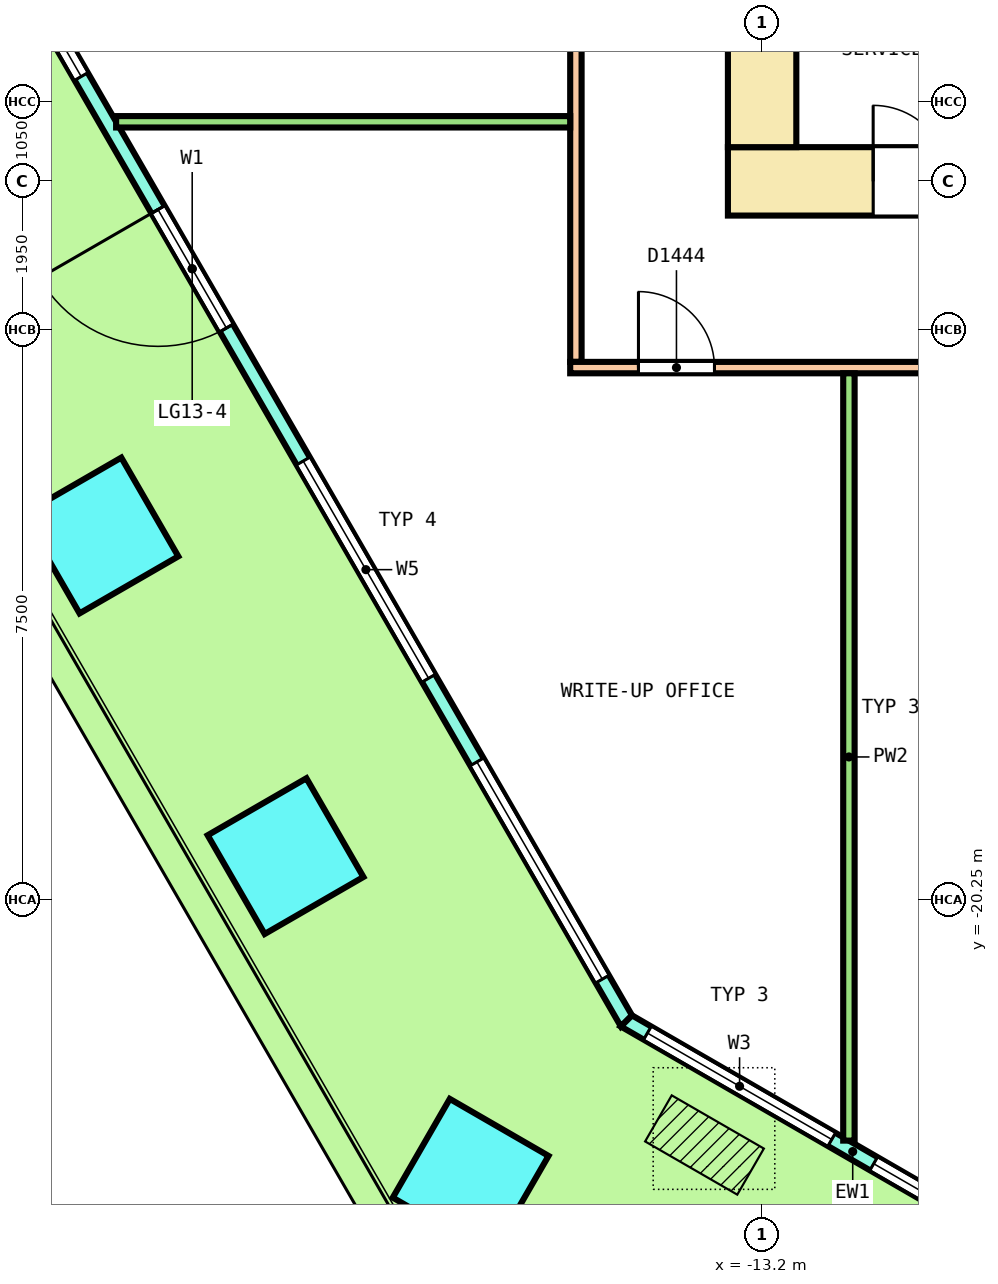
"""IFC4 building model, lengths in metres.
Left out: names, types, materials, properties, quantities, classifications, styles, units other than length and angle.
Written with IfcOpenShell. Run it as: python <this file> out.ifc"""

import sys

from ifc_helpers import new_model, si_unit, direction, frame, frame_2d, origin, origin_2d, place, context, subcontext, project, spatial, polyline, rectangle, outline, extrude, element, fill, save


model = new_model("IFC4")
c1 = context("Model", 3, precision=1e-05, world=origin(), true_north=direction((0.0, 1.0)))
c2 = subcontext(c1, "Body", "Model", "MODEL_VIEW")
j1 = project(units=[si_unit("LENGTHUNIT", "METRE"), si_unit("PLANEANGLEUNIT", "RADIAN")], contexts=[c1])
p1 = place(None, origin())
s1 = spatial("IfcSite", under=j1, at=p1, CompositionType="ELEMENT")
p2 = place(p1, origin())
s2 = spatial("IfcBuilding", under=s1, at=p2, CompositionType="ELEMENT")
p3 = place(p2, frame((0.0, 0.0, 58.6)))
s3 = spatial("IfcBuildingStorey", under=s2, at=p3, CompositionType="ELEMENT", Elevation=58.6)
for number, where, z_axis, x_axis in (
    (1, (-21.905, -15.459, 0.0), (0.0, 0.0, 1.0), (0.5, -0.866, 0.0)),
    (2, (-19.47, -19.677, 0.0), (0.0, 0.0, 1.0), (0.5, -0.866, 0.0)),
    (3, (-17.035, -23.895, 0.0), (0.0, 0.0, 1.0), (0.866, -0.5, 0.0)),
):
    element("IfcColumn", number, at=place(p3, frame(where, z_axis=z_axis, x_axis=x_axis)), inside=s3, PredefinedType="COLUMN", context=c2, shape_type="SweptSolid", body=[
        extrude(rectangle(XDim=1.5, YDim=1.5, at=origin_2d()), origin(), (0.0, 0.0, 1.0), 4.05),
    ])
p4 = place(p3, frame((-26.411, -2.055, 0.0), z_axis=(0.0, 0.0, 1.0), x_axis=(0.50000204422, -0.86602422355, 0.0)))
e4 = element("IfcWall", 4, at=p4, inside=s3, PredefinedType="SOLIDWALL", context=c2, shape_type="SweptSolid", body=[
    extrude(outline(polyline([(-0.027, -0.1), (1.014, -0.1), (2.055, -0.1), (3.097, -0.1), (4.138, -0.1), (5.179, -0.1), (6.22, -0.1), (7.261, -0.1), (8.303, -0.1), (9.344, -0.1), (10.385, -0.1), (11.426, -0.1), (12.468, -0.1), (13.509, -0.1), (14.55, -0.1), (15.591, -0.1), (16.632, -0.1), (17.673, -0.1), (18.715, -0.1), (19.756, -0.1), (20.797, -0.1), (21.838, -0.1), (22.879, -0.1), (22.826, 0.1), (21.789, 0.1), (20.753, 0.1), (19.717, 0.1), (18.68, 0.1), (17.644, 0.1), (16.608, 0.1), (15.572, 0.1), (14.535, 0.1), (13.499, 0.1), (12.463, 0.1), (11.426, 0.1), (10.39, 0.1), (9.354, 0.1), (8.317, 0.1), (7.281, 0.1), (6.245, 0.1), (5.208, 0.1), (4.172, 0.1), (3.136, 0.1), (2.099, 0.1), (1.063, 0.1), (0.027, 0.1), (-0.027, -0.1)])), origin(), (0.0, 0.0, 1.0), 4.1),
])
p5 = place(p4, frame((0.635, 0.0, 0.1)))
e5 = element("IfcOpeningElement", 5, at=p5, cuts=e4, PredefinedType="OPENING", context=c2, shape_type="SweptSolid", body=[
    extrude(rectangle(XDim=3.3, YDim=2.9, at=frame_2d((1.65, 1.45))), frame((0.0, 0.11, 0.0), z_axis=(0.0, -1.0, 0.0), x_axis=(1.0, 0.0, 0.0)), (0.0, 0.0, 1.0), 0.22),
])
p6 = place(p4, frame((5.206, 0.0, 0.1)))
e6 = element("IfcOpeningElement", 6, at=p6, cuts=e4, PredefinedType="OPENING", context=c2, shape_type="SweptSolid", body=[
    extrude(rectangle(XDim=3.3, YDim=2.9, at=frame_2d((1.65, 1.45))), frame((0.0, 0.11, 0.0), z_axis=(0.0, -1.0, 0.0), x_axis=(1.0, 0.0, 0.0)), (0.0, 0.0, 1.0), 0.22),
])
p7 = place(p4, frame((10.526, 0.0, 0.0)))
e7 = element("IfcOpeningElement", 7, at=p7, cuts=e4, PredefinedType="OPENING", context=c2, shape_type="SweptSolid", body=[
    extrude(rectangle(XDim=1.8, YDim=2.4, at=frame_2d((0.9, 1.2))), frame((0.0, 0.11, 0.0), z_axis=(0.0, -1.0, 0.0), x_axis=(1.0, 0.0, 0.0)), (0.0, 0.0, 1.0), 0.22),
])
p8 = place(p4, frame((10.526, 0.0, 2.55)))
e8 = element("IfcOpeningElement", 8, at=p8, cuts=e4, PredefinedType="OPENING", context=c2, shape_type="SweptSolid", body=[
    extrude(rectangle(XDim=1.8, YDim=0.45, at=frame_2d((0.9, 0.225))), frame((0.0, 0.11, 0.0), z_axis=(0.0, -1.0, 0.0), x_axis=(1.0, 0.0, 0.0)), (0.0, 0.0, 1.0), 0.22),
])
p9 = place(p4, frame((14.347, 0.0, 0.1)))
e9 = element("IfcOpeningElement", 9, at=p9, cuts=e4, PredefinedType="OPENING", context=c2, shape_type="SweptSolid", body=[
    extrude(rectangle(XDim=3.3, YDim=2.9, at=frame_2d((1.65, 1.45))), frame((0.0, 0.11, 0.0), z_axis=(0.0, -1.0, 0.0), x_axis=(1.0, 0.0, 0.0)), (0.0, 0.0, 1.0), 0.22),
])
p10 = place(p4, frame((18.917, 0.0, 0.1)))
e10 = element("IfcOpeningElement", 10, at=p10, cuts=e4, PredefinedType="OPENING", context=c2, shape_type="SweptSolid", body=[
    extrude(rectangle(XDim=3.3, YDim=2.9, at=frame_2d((1.65, 1.45))), frame((0.0, 0.11, 0.0), z_axis=(0.0, -1.0, 0.0), x_axis=(1.0, 0.0, 0.0)), (0.0, 0.0, 1.0), 0.22),
])
p11 = place(p3, frame((-14.985, -21.845, 0.0), z_axis=(0.0, 0.0, 1.0), x_axis=(0.866029458321, -0.49999297727, 0.0)))
e11 = element("IfcWall", 11, at=p11, inside=s3, PredefinedType="SOLIDWALL", context=c2, shape_type="SweptSolid", body=[
    extrude(outline(polyline([(-0.027, -0.1), (1.128, -0.1), (2.282, -0.1), (3.437, -0.1), (4.592, -0.1), (5.747, -0.1), (6.901, -0.1), (6.848, 0.1), (5.711, 0.1), (4.574, 0.1), (3.437, 0.1), (2.301, 0.1), (1.164, 0.1), (0.027, 0.1), (-0.027, -0.1)])), origin(), (0.0, 0.0, 1.0), 4.1),
])
p12 = place(p11, frame((0.319, 0.0, 0.1)))
e12 = element("IfcOpeningElement", 12, at=p12, cuts=e11, PredefinedType="OPENING", context=c2, shape_type="SweptSolid", body=[
    extrude(rectangle(XDim=2.8, YDim=2.9, at=frame_2d((1.4, 1.45))), frame((0.0, 0.11, 0.0), z_axis=(0.0, -1.0, 0.0), x_axis=(1.0, 0.0, 0.0)), (0.0, 0.0, 1.0), 0.22),
])
p13 = place(p11, frame((3.756, 0.0, 0.1)))
e13 = element("IfcOpeningElement", 13, at=p13, cuts=e11, PredefinedType="OPENING", context=c2, shape_type="SweptSolid", body=[
    extrude(rectangle(XDim=2.8, YDim=2.9, at=frame_2d((1.4, 1.45))), frame((0.0, 0.11, 0.0), z_axis=(0.0, -1.0, 0.0), x_axis=(1.0, 0.0, 0.0)), (0.0, 0.0, 1.0), 0.22),
])
p14 = place(p3, frame((-13.65, -10.8, 0.0), z_axis=(0.0, 0.0, 1.0), x_axis=(1.0, 0.0, 0.0)))
e14 = element("IfcWall", 14, at=p14, inside=s3, PredefinedType="SHEAR", context=c2, shape_type="SweptSolid", body=[
    extrude(rectangle(XDim=27.3, YDim=0.9, at=frame_2d((13.65, 0.0))), origin(), (0.0, 0.0, 1.0), 4.1),
])
p15 = place(p14, frame((1.911, 0.0, 0.0)))
e15 = element("IfcOpeningElement", 15, at=p15, cuts=e14, PredefinedType="OPENING", context=c2, shape_type="SweptSolid", body=[
    extrude(rectangle(XDim=1.0, YDim=2.1, at=frame_2d((0.5, 1.05))), frame((0.0, 0.46, 0.0), z_axis=(0.0, -1.0, 0.0), x_axis=(1.0, 0.0, 0.0)), (0.0, 0.0, 1.0), 0.92),
])
p16 = place(p14, frame((5.027, 0.0, 0.0)))
e16 = element("IfcOpeningElement", 16, at=p16, cuts=e14, PredefinedType="OPENING", context=c2, shape_type="SweptSolid", body=[
    extrude(rectangle(XDim=1.0, YDim=2.1, at=frame_2d((0.5, 1.05))), frame((0.0, 0.46, 0.0), z_axis=(0.0, -1.0, 0.0), x_axis=(1.0, 0.0, 0.0)), (0.0, 0.0, 1.0), 0.92),
])
p17 = place(p14, frame((8.111, 0.0, 0.0)))
e17 = element("IfcOpeningElement", 17, at=p17, cuts=e14, PredefinedType="OPENING", context=c2, shape_type="SweptSolid", body=[
    extrude(rectangle(XDim=1.0, YDim=2.1, at=frame_2d((0.5, 1.05))), frame((0.0, 0.46, 0.0), z_axis=(0.0, -1.0, 0.0), x_axis=(1.0, 0.0, 0.0)), (0.0, 0.0, 1.0), 0.92),
])
p18 = place(p14, frame((11.195, 0.0, 0.0)))
e18 = element("IfcOpeningElement", 18, at=p18, cuts=e14, PredefinedType="OPENING", context=c2, shape_type="SweptSolid", body=[
    extrude(rectangle(XDim=1.0, YDim=2.1, at=frame_2d((0.5, 1.05))), frame((0.0, 0.46, 0.0), z_axis=(0.0, -1.0, 0.0), x_axis=(1.0, 0.0, 0.0)), (0.0, 0.0, 1.0), 0.92),
])
p19 = place(p14, frame((19.202, 0.0, 0.0)))
e19 = element("IfcOpeningElement", 19, at=p19, cuts=e14, PredefinedType="OPENING", context=c2, shape_type="SweptSolid", body=[
    extrude(rectangle(XDim=1.0, YDim=2.1, at=frame_2d((0.5, 1.05))), frame((0.0, 0.46, 0.0), z_axis=(0.0, -1.0, 0.0), x_axis=(1.0, 0.0, 0.0)), (0.0, 0.0, 1.0), 0.92),
])
p20 = place(p14, frame((21.881, 0.0, 0.0)))
e20 = element("IfcOpeningElement", 20, at=p20, cuts=e14, PredefinedType="OPENING", context=c2, shape_type="SweptSolid", body=[
    extrude(rectangle(XDim=1.0, YDim=2.1, at=frame_2d((0.5, 1.05))), frame((0.0, 0.46, 0.0), z_axis=(0.0, -1.0, 0.0), x_axis=(1.0, 0.0, 0.0)), (0.0, 0.0, 1.0), 0.92),
])
p21 = place(p14, frame((24.592, 0.0, 0.0)))
e21 = element("IfcOpeningElement", 21, at=p21, cuts=e14, PredefinedType="OPENING", context=c2, shape_type="SweptSolid", body=[
    extrude(rectangle(XDim=1.0, YDim=2.1, at=frame_2d((0.5, 1.05))), frame((0.0, 0.46, 0.0), z_axis=(0.0, -1.0, 0.0), x_axis=(1.0, 0.0, 0.0)), (0.0, 0.0, 1.0), 0.92),
])
p22 = place(p14, frame((15.2, 0.0, 0.0)))
e22 = element("IfcOpeningElement", 22, at=p22, cuts=e14, PredefinedType="OPENING", context=c2, shape_type="SweptSolid", body=[
    extrude(rectangle(XDim=1.2, YDim=2.1, at=frame_2d((0.6, 1.05))), frame((0.0, 0.46, 0.0), z_axis=(0.0, -1.0, 0.0), x_axis=(1.0, 0.0, 0.0)), (0.0, 0.0, 1.0), 0.92),
])
p23 = place(p3, frame((-13.2, -10.35, 0.0), z_axis=(0.0, 0.0, 1.0), x_axis=(0.0, 1.0, 0.0)))
e23 = element("IfcWall", 23, at=p23, inside=s3, PredefinedType="SHEAR", context=c2, shape_type="SweptSolid", body=[
    extrude(rectangle(XDim=20.7, YDim=0.9, at=frame_2d((10.35, 0.0))), origin(), (0.0, 0.0, 1.0), 4.1),
])
p24 = place(p23, frame((9.15, 0.0, 0.0)))
e24 = element("IfcOpeningElement", 24, at=p24, cuts=e23, PredefinedType="OPENING", context=c2, shape_type="SweptSolid", body=[
    extrude(rectangle(XDim=2.4, YDim=2.1, at=frame_2d((1.2, 1.05))), frame((0.0, 0.46, 0.0), z_axis=(0.0, -1.0, 0.0), x_axis=(1.0, 0.0, 0.0)), (0.0, 0.0, 1.0), 0.92),
])
p25 = place(p23, frame((16.05, 0.0, 0.0)))
e25 = element("IfcOpeningElement", 25, at=p25, cuts=e23, PredefinedType="OPENING", context=c2, shape_type="SweptSolid", body=[
    extrude(rectangle(XDim=1.2, YDim=2.1, at=frame_2d((0.6, 1.05))), frame((0.0, 0.46, 0.0), z_axis=(0.0, -1.0, 0.0), x_axis=(1.0, 0.0, 0.0)), (0.0, 0.0, 1.0), 0.92),
])
p26 = place(p23, frame((3.45, 0.0, 0.0)))
e26 = element("IfcOpeningElement", 26, at=p26, cuts=e23, PredefinedType="OPENING", context=c2, shape_type="SweptSolid", body=[
    extrude(rectangle(XDim=1.2, YDim=2.1, at=frame_2d((0.6, 1.05))), frame((0.0, 0.46, 0.0), z_axis=(0.0, -1.0, 0.0), x_axis=(1.0, 0.0, 0.0)), (0.0, 0.0, 1.0), 0.92),
])
p27 = place(p3, frame((-15.65, -13.175, 0.0), z_axis=(0.0, 0.0, 1.0), x_axis=(0.0, 1.0, 0.0)))
e27 = element("IfcWall", 27, at=p27, inside=s3, PredefinedType="PARTITIONING", context=c2, shape_type="SweptSolid", body=[
    extrude(rectangle(XDim=26.35, YDim=0.15, at=frame_2d((13.175, 0.0))), origin(), (0.0, 0.0, 1.0), 3.05),
])
p28 = place(p27, frame((24.797, 0.0, 0.0)))
e28 = element("IfcOpeningElement", 28, at=p28, cuts=e27, PredefinedType="OPENING", context=c2, shape_type="SweptSolid", body=[
    extrude(rectangle(XDim=1.0, YDim=2.1, at=frame_2d((0.5, 1.05))), frame((0.0, 0.085, 0.0), z_axis=(0.0, -1.0, 0.0), x_axis=(1.0, 0.0, 0.0)), (0.0, 0.0, 1.0), 0.17),
])
p29 = place(p27, frame((21.346, 0.0, 0.0)))
e29 = element("IfcOpeningElement", 29, at=p29, cuts=e27, PredefinedType="OPENING", context=c2, shape_type="SweptSolid", body=[
    extrude(rectangle(XDim=1.0, YDim=2.1, at=frame_2d((0.5, 1.05))), frame((0.0, 0.085, 0.0), z_axis=(0.0, -1.0, 0.0), x_axis=(1.0, 0.0, 0.0)), (0.0, 0.0, 1.0), 0.17),
])
p30 = place(p27, frame((8.046, 0.0, 0.0)))
e30 = element("IfcOpeningElement", 30, at=p30, cuts=e27, PredefinedType="OPENING", context=c2, shape_type="SweptSolid", body=[
    extrude(rectangle(XDim=1.2, YDim=2.1, at=frame_2d((0.6, 1.05))), frame((0.0, 0.085, 0.0), z_axis=(0.0, -1.0, 0.0), x_axis=(1.0, 0.0, 0.0)), (0.0, 0.0, 1.0), 0.17),
])
p31 = place(p3, frame((-15.725, -13.25, 0.0), z_axis=(0.0, 0.0, 1.0), x_axis=(1.0, 0.0, 0.0)))
e31 = element("IfcWall", 31, at=p31, inside=s3, PredefinedType="PARTITIONING", context=c2, shape_type="SweptSolid", body=[
    extrude(rectangle(XDim=31.325, YDim=0.15, at=frame_2d((15.663, 0.0))), origin(), (0.0, 0.0, 1.0), 3.05),
])
p32 = place(p31, frame((0.898, 0.0, 0.0)))
e32 = element("IfcOpeningElement", 32, at=p32, cuts=e31, PredefinedType="OPENING", context=c2, shape_type="SweptSolid", body=[
    extrude(rectangle(XDim=1.0, YDim=2.1, at=frame_2d((0.5, 1.05))), frame((0.0, 0.085, 0.0), z_axis=(0.0, -1.0, 0.0), x_axis=(1.0, 0.0, 0.0)), (0.0, 0.0, 1.0), 0.17),
])
p33 = place(p31, frame((5.198, 0.0, 0.0)))
e33 = element("IfcOpeningElement", 33, at=p33, cuts=e31, PredefinedType="OPENING", context=c2, shape_type="SweptSolid", body=[
    extrude(rectangle(XDim=1.2, YDim=2.1, at=frame_2d((0.6, 1.05))), frame((0.0, 0.085, 0.0), z_axis=(0.0, -1.0, 0.0), x_axis=(1.0, 0.0, 0.0)), (0.0, 0.0, 1.0), 0.17),
])
p34 = place(p31, frame((14.115, 0.0, 0.0)))
e34 = element("IfcOpeningElement", 34, at=p34, cuts=e31, PredefinedType="OPENING", context=c2, shape_type="SweptSolid", body=[
    extrude(rectangle(XDim=1.2, YDim=2.1, at=frame_2d((0.6, 1.05))), frame((0.0, 0.085, 0.0), z_axis=(0.0, -1.0, 0.0), x_axis=(1.0, 0.0, 0.0)), (0.0, 0.0, 1.0), 0.17),
])
p35 = place(p31, frame((22.046, 0.0, 0.0)))
e35 = element("IfcOpeningElement", 35, at=p35, cuts=e31, PredefinedType="OPENING", context=c2, shape_type="SweptSolid", body=[
    extrude(rectangle(XDim=1.0, YDim=2.1, at=frame_2d((0.5, 1.05))), frame((0.0, 0.085, 0.0), z_axis=(0.0, -1.0, 0.0), x_axis=(1.0, 0.0, 0.0)), (0.0, 0.0, 1.0), 0.17),
])
p36 = place(p31, frame((28.358, 0.0, 0.0)))
e36 = element("IfcOpeningElement", 36, at=p36, cuts=e31, PredefinedType="OPENING", context=c2, shape_type="SweptSolid", body=[
    extrude(rectangle(XDim=1.0, YDim=2.1, at=frame_2d((0.5, 1.05))), frame((0.0, 0.085, 0.0), z_axis=(0.0, -1.0, 0.0), x_axis=(1.0, 0.0, 0.0)), (0.0, 0.0, 1.0), 0.17),
])
p37 = place(p3, frame((-21.699, -10.016, 0.0), z_axis=(0.0, 0.0, 1.0), x_axis=(1.0, 0.0, 0.0)))
e37 = element("IfcWall", 37, at=p37, inside=s3, PredefinedType="PARTITIONING", context=c2, shape_type="SweptSolid", body=[
    extrude(rectangle(XDim=5.974, YDim=0.15, at=frame_2d((2.987, 0.0))), origin(), (0.0, 0.0, 1.0), 3.05),
])
p38 = place(p3, frame((-12.058, -23.42, 0.0), z_axis=(0.0, 0.0, 1.0), x_axis=(0.0, 1.0, 0.0)))
e38 = element("IfcWall", 38, at=p38, inside=s3, PredefinedType="PARTITIONING", context=c2, shape_type="SweptSolid", body=[
    extrude(rectangle(XDim=10.095, YDim=0.15, at=frame_2d((5.047, 0.0))), origin(), (0.0, 0.0, 1.0), 3.05),
])
p39 = place(p6, origin())
e39 = element("IfcWindow", 39, at=p39, inside=s3, PartitioningType="SINGLE_PANEL", PredefinedType="WINDOW", context=c2, shape_type="SweptSolid", body=[
    extrude(rectangle(XDim=3.3, YDim=2.9, at=frame_2d((1.65, 1.45))), frame((0.0, 0.03, 0.0), z_axis=(0.0, -1.0, 0.0), x_axis=(1.0, 0.0, 0.0)), (0.0, 0.0, 1.0), 0.06),
])
fill(e6, e39)
p40 = place(p7, origin())
e40 = element("IfcDoor", 40, at=p40, inside=s3, OperationType="DOUBLE_DOOR_SINGLE_SWING", PredefinedType="DOOR", context=c2, shape_type="SweptSolid", body=[
    extrude(rectangle(XDim=1.8, YDim=2.4, at=frame_2d((0.9, 1.2))), frame((0.0, 0.025, 0.0), z_axis=(0.0, -1.0, 0.0), x_axis=(1.0, 0.0, 0.0)), (0.0, 0.0, 1.0), 0.05),
])
fill(e7, e40)
p41 = place(p8, origin())
e41 = element("IfcWindow", 41, at=p41, inside=s3, PartitioningType="SINGLE_PANEL", PredefinedType="WINDOW", context=c2, shape_type="SweptSolid", body=[
    extrude(rectangle(XDim=1.8, YDim=0.45, at=frame_2d((0.9, 0.225))), frame((0.0, 0.03, 0.0), z_axis=(0.0, -1.0, 0.0), x_axis=(1.0, 0.0, 0.0)), (0.0, 0.0, 1.0), 0.06),
])
fill(e8, e41)
p42 = place(p9, origin())
e42 = element("IfcWindow", 42, at=p42, inside=s3, PartitioningType="SINGLE_PANEL", PredefinedType="WINDOW", context=c2, shape_type="SweptSolid", body=[
    extrude(rectangle(XDim=3.3, YDim=2.9, at=frame_2d((1.65, 1.45))), frame((0.0, 0.03, 0.0), z_axis=(0.0, -1.0, 0.0), x_axis=(1.0, 0.0, 0.0)), (0.0, 0.0, 1.0), 0.06),
])
fill(e9, e42)
p43 = place(p10, origin())
e43 = element("IfcWindow", 43, at=p43, inside=s3, PartitioningType="SINGLE_PANEL", PredefinedType="WINDOW", context=c2, shape_type="SweptSolid", body=[
    extrude(rectangle(XDim=3.3, YDim=2.9, at=frame_2d((1.65, 1.45))), frame((0.0, 0.03, 0.0), z_axis=(0.0, -1.0, 0.0), x_axis=(1.0, 0.0, 0.0)), (0.0, 0.0, 1.0), 0.06),
])
fill(e10, e43)
p44 = place(p12, origin())
e44 = element("IfcWindow", 44, at=p44, inside=s3, PartitioningType="SINGLE_PANEL", PredefinedType="WINDOW", context=c2, shape_type="SweptSolid", body=[
    extrude(rectangle(XDim=2.8, YDim=2.9, at=frame_2d((1.4, 1.45))), frame((0.0, 0.03, 0.0), z_axis=(0.0, -1.0, 0.0), x_axis=(1.0, 0.0, 0.0)), (0.0, 0.0, 1.0), 0.06),
])
fill(e12, e44)
p45 = place(p13, origin())
e45 = element("IfcWindow", 45, at=p45, inside=s3, PartitioningType="SINGLE_PANEL", PredefinedType="WINDOW", context=c2, shape_type="SweptSolid", body=[
    extrude(rectangle(XDim=2.8, YDim=2.9, at=frame_2d((1.4, 1.45))), frame((0.0, 0.03, 0.0), z_axis=(0.0, -1.0, 0.0), x_axis=(1.0, 0.0, 0.0)), (0.0, 0.0, 1.0), 0.06),
])
fill(e13, e45)
p46 = place(p15, origin())
e46 = element("IfcDoor", 46, at=p46, inside=s3, OperationType="SINGLE_SWING_LEFT", PredefinedType="DOOR", context=c2, shape_type="SweptSolid", body=[
    extrude(rectangle(XDim=1.0, YDim=2.1, at=frame_2d((0.5, 1.05))), frame((0.0, 0.3, 0.0), z_axis=(0.0, -1.0, 0.0), x_axis=(1.0, 0.0, 0.0)), (0.0, 0.0, 1.0), 0.6),
])
fill(e15, e46)
p47 = place(p32, origin())
e47 = element("IfcDoor", 47, at=p47, inside=s3, OperationType="SINGLE_SWING_RIGHT", PredefinedType="DOOR", context=c2, shape_type="SweptSolid", body=[
    extrude(rectangle(XDim=1.0, YDim=2.1, at=frame_2d((0.5, 1.05))), frame((0.0, 0.025, 0.0), z_axis=(0.0, -1.0, 0.0), x_axis=(1.0, 0.0, 0.0)), (0.0, 0.0, 1.0), 0.05),
])
fill(e32, e47)
save(model, sys.argv[1])
